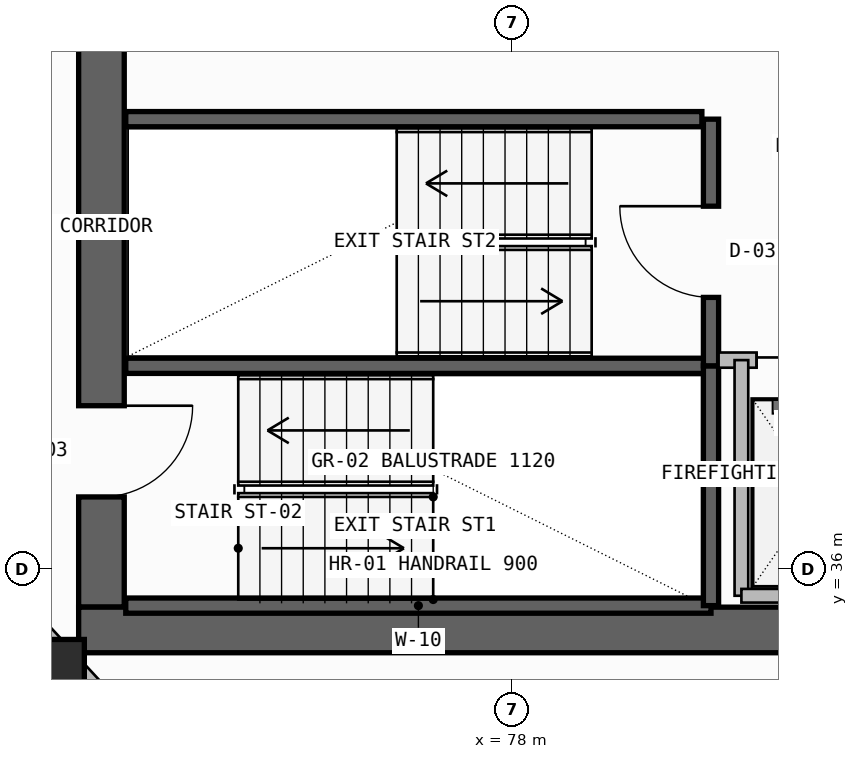
"""IFC4 building model, lengths in metres.
Left out: names, types, materials, properties, quantities, classifications, styles, units other than length and angle.
Written with IfcOpenShell. Run it as: python <this file> out.ifc"""

import sys

from ifc_helpers import new_model, si_unit, direction, frame, frame_2d, origin, origin_2d, place, context, subcontext, project, spatial, rectangle, extrude, element, fill, save


model = new_model("IFC4")
c1 = context("Model", 3, precision=1e-05, world=origin(), true_north=direction((0.0, 1.0)))
c2 = subcontext(c1, "Body", "Model", "MODEL_VIEW")
j1 = project(units=[si_unit("LENGTHUNIT", "METRE"), si_unit("PLANEANGLEUNIT", "RADIAN")], contexts=[c1])
p1 = place(None, origin())
s1 = spatial("IfcSite", under=j1, at=p1, CompositionType="ELEMENT")
p2 = place(p1, origin())
s2 = spatial("IfcBuilding", under=s1, at=p2, CompositionType="ELEMENT")
p3 = place(p2, frame((0.0, 0.0, 271.3)))
s3 = spatial("IfcBuildingStorey", under=s2, at=p3, CompositionType="ELEMENT", Elevation=271.3)
p4 = place(p3, frame((72.6, 35.5, -0.26), z_axis=(0.0, 0.0, 1.0), x_axis=(0.0, 1.0, 0.0)))
e1 = element("IfcWall", 1, at=p4, inside=s3, PredefinedType="SHEAR", context=c2, shape_type="SweptSolid", body=[
    extrude(rectangle(XDim=7.85, YDim=0.6, at=frame_2d((3.925, 0.0))), origin(), (0.0, 0.0, 1.0), 3.52),
])
p5 = place(p4, frame((1.45, 0.0, 0.26)))
e2 = element("IfcOpeningElement", 2, at=p5, cuts=e1, PredefinedType="OPENING", context=c2, shape_type="SweptSolid", body=[
    extrude(rectangle(XDim=1.2, YDim=2.2, at=frame_2d((0.6, 1.1))), frame((0.0, 0.31, 0.0), z_axis=(0.0, -1.0, 0.0), x_axis=(1.0, 0.0, 0.0)), (0.0, 0.0, 1.0), 0.62),
])
p6 = place(p3, frame((72.3, 35.2, -0.26), z_axis=(0.0, 0.0, 1.0), x_axis=(1.0, 0.0, 0.0)))
e3 = element("IfcWall", 3, at=p6, inside=s3, PredefinedType="SHEAR", context=c2, shape_type="SweptSolid", body=[
    extrude(rectangle(XDim=13.3, YDim=0.6, at=frame_2d((6.65, 0.0))), origin(), (0.0, 0.0, 1.0), 3.52),
])
p7 = place(p3, frame((72.0, 34.7, 0.0), z_axis=(0.0, 0.0, 1.0), x_axis=(1.0, 0.0, 0.0)))
e4 = element("IfcColumn", 4, at=p7, inside=s3, PredefinedType="COLUMN", context=c2, shape_type="SweptSolid", body=[
    extrude(rectangle(XDim=0.75, YDim=0.75, at=origin_2d()), origin(), (0.0, 0.0, 1.0), 3.52),
])
p8 = place(p3, frame((72.881, 34.058, 0.0), z_axis=(0.0, 0.0, 1.0), x_axis=(-0.678651758246, 0.734460203843, 0.0)))
e5 = element("IfcWall", 5, at=p8, inside=s3, PredefinedType="PARAPET", context=c2, shape_type="SweptSolid", body=[
    extrude(rectangle(XDim=0.927, YDim=0.2, at=frame_2d((0.464, 0.0))), origin(), (0.0, 0.0, 1.0), 1.15),
])
p9 = place(p3, frame((72.059, 34.948, 0.0), z_axis=(0.0, 0.0, 1.0), x_axis=(-0.678740051818, 0.734378609478, 0.0)))
e6 = element("IfcWall", 6, at=p9, inside=s3, PredefinedType="PARAPET", context=c2, shape_type="SweptSolid", body=[
    extrude(rectangle(XDim=0.97, YDim=0.2, at=frame_2d((0.485, 0.0))), origin(), (0.0, 0.0, 1.0), 1.15),
])
for number, where, z_axis, x_axis in (
    (7, (72.92, 35.52, -0.26), (0.0, 0.0, 1.0), (1.0, 0.0, 0.0)),
    (8, (72.92, 38.675, -0.26), (0.0, 0.0, 1.0), (1.0, 0.0, 0.0)),
):
    element("IfcWall", number, at=place(p3, frame(where, z_axis=z_axis, x_axis=x_axis)), inside=s3, PredefinedType="SOLIDWALL", context=c2, shape_type="SweptSolid", body=[
        extrude(rectangle(XDim=7.7, YDim=0.2, at=frame_2d((3.85, 0.0))), origin(), (0.0, 0.0, 1.0), 3.52),
    ])
p10 = place(p3, frame((80.62, 35.52, -0.26), z_axis=(0.0, 0.0, 1.0), x_axis=(0.0, 1.0, 0.0)))
e9 = element("IfcWall", 9, at=p10, inside=s3, PredefinedType="SOLIDWALL", context=c2, shape_type="SweptSolid", body=[
    extrude(rectangle(XDim=3.155, YDim=0.2, at=frame_2d((1.578, 0.0))), origin(), (0.0, 0.0, 1.0), 3.52),
])
p11 = place(p3, frame((80.62, 38.675, -0.26), z_axis=(0.0, 0.0, 1.0), x_axis=(0.0, 1.0, 0.0)))
e10 = element("IfcWall", 10, at=p11, inside=s3, PredefinedType="SOLIDWALL", context=c2, shape_type="SweptSolid", body=[
    extrude(rectangle(XDim=3.245, YDim=0.2, at=frame_2d((1.623, 0.0))), origin(), (0.0, 0.0, 1.0), 3.52),
])
p12 = place(p11, frame((0.9, 0.0, 0.26)))
e11 = element("IfcOpeningElement", 11, at=p12, cuts=e10, PredefinedType="OPENING", context=c2, shape_type="SweptSolid", body=[
    extrude(rectangle(XDim=1.2, YDim=2.2, at=frame_2d((0.6, 1.1))), frame((0.0, 0.11, 0.0), z_axis=(0.0, -1.0, 0.0), x_axis=(1.0, 0.0, 0.0)), (0.0, 0.0, 1.0), 0.22),
])
p13 = place(p3, frame((80.72, 38.75, 0.0), z_axis=(0.0, 0.0, 1.0), x_axis=(1.0, 0.0, 0.0)))
e12 = element("IfcWall", 12, at=p13, inside=s3, PredefinedType="SOLIDWALL", context=c2, shape_type="SweptSolid", body=[
    extrude(rectangle(XDim=4.26, YDim=0.2, at=frame_2d((2.13, 0.0))), origin(), (0.0, 0.0, 1.0), 3.26),
])
p14 = place(p13, frame((0.5, 0.0, 0.0)))
e13 = element("IfcOpeningElement", 13, at=p14, cuts=e12, PredefinedType="OPENING", context=c2, shape_type="SweptSolid", body=[
    extrude(rectangle(XDim=1.3, YDim=2.3, at=frame_2d((0.65, 1.15))), frame((0.0, 0.11, 0.0), z_axis=(0.0, -1.0, 0.0), x_axis=(1.0, 0.0, 0.0)), (0.0, 0.0, 1.0), 0.22),
])
p15 = place(p13, frame((2.45, 0.0, 0.0)))
e14 = element("IfcOpeningElement", 14, at=p15, cuts=e12, PredefinedType="OPENING", context=c2, shape_type="SweptSolid", body=[
    extrude(rectangle(XDim=1.3, YDim=2.3, at=frame_2d((0.65, 1.15))), frame((0.0, 0.11, 0.0), z_axis=(0.0, -1.0, 0.0), x_axis=(1.0, 0.0, 0.0)), (0.0, 0.0, 1.0), 0.22),
])
p16 = place(p3, frame((81.02, 35.65, 0.0), z_axis=(0.0, 0.0, 1.0), x_axis=(0.0, 1.0, 0.0)))
e15 = element("IfcWall", 15, at=p16, inside=s3, PredefinedType="SOLIDWALL", context=c2, shape_type="SweptSolid", body=[
    extrude(rectangle(XDim=3.1, YDim=0.18, at=frame_2d((1.55, 0.0))), origin(), (0.0, 0.0, 1.0), 3.26),
])
p17 = place(p3, frame((81.02, 35.65, 0.0), z_axis=(0.0, 0.0, 1.0), x_axis=(1.0, 0.0, 0.0)))
e16 = element("IfcWall", 16, at=p17, inside=s3, PredefinedType="SOLIDWALL", context=c2, shape_type="SweptSolid", body=[
    extrude(rectangle(XDim=3.93, YDim=0.18, at=frame_2d((1.965, 0.0))), origin(), (0.0, 0.0, 1.0), 3.26),
])
p18 = place(p3, frame((72.92, 41.92, -0.26), z_axis=(0.0, 0.0, 1.0), x_axis=(1.0, 0.0, 0.0)))
e17 = element("IfcWall", 17, at=p18, inside=s3, PredefinedType="SOLIDWALL", context=c2, shape_type="SweptSolid", body=[
    extrude(rectangle(XDim=7.58, YDim=0.2, at=frame_2d((3.79, 0.0))), origin(), (0.0, 0.0, 1.0), 3.52),
])
p19 = place(p5, frame((1.2, 0.0, 0.0), z_axis=(0.0, 0.0, 1.0), x_axis=(-1.0, 0.0, 0.0)))
e18 = element("IfcDoor", 18, at=p19, inside=s3, OperationType="SINGLE_SWING_LEFT", PredefinedType="USERDEFINED", context=c2, shape_type="SweptSolid", body=[
    extrude(rectangle(XDim=1.2, YDim=2.2, at=frame_2d((0.6, 1.1))), frame((0.0, 0.025, 0.0), z_axis=(0.0, -1.0, 0.0), x_axis=(1.0, 0.0, 0.0)), (0.0, 0.0, 1.0), 0.05),
])
fill(e2, e18)
p20 = place(p12, origin())
e19 = element("IfcDoor", 19, at=p20, inside=s3, OperationType="SINGLE_SWING_RIGHT", PredefinedType="USERDEFINED", context=c2, shape_type="SweptSolid", body=[
    extrude(rectangle(XDim=1.2, YDim=2.2, at=frame_2d((0.6, 1.1))), frame((0.0, 0.025, 0.0), z_axis=(0.0, -1.0, 0.0), x_axis=(1.0, 0.0, 0.0)), (0.0, 0.0, 1.0), 0.05),
])
fill(e11, e19)
p21 = place(p14, origin())
e20 = element("IfcDoor", 20, at=p21, inside=s3, OperationType="DOUBLE_DOOR_SLIDING", PredefinedType="DOOR", context=c2, shape_type="SweptSolid", body=[
    extrude(rectangle(XDim=1.3, YDim=2.3, at=frame_2d((0.65, 1.15))), frame((0.0, 0.025, 0.0), z_axis=(0.0, -1.0, 0.0), x_axis=(1.0, 0.0, 0.0)), (0.0, 0.0, 1.0), 0.05),
])
fill(e13, e20)
save(model, sys.argv[1])
